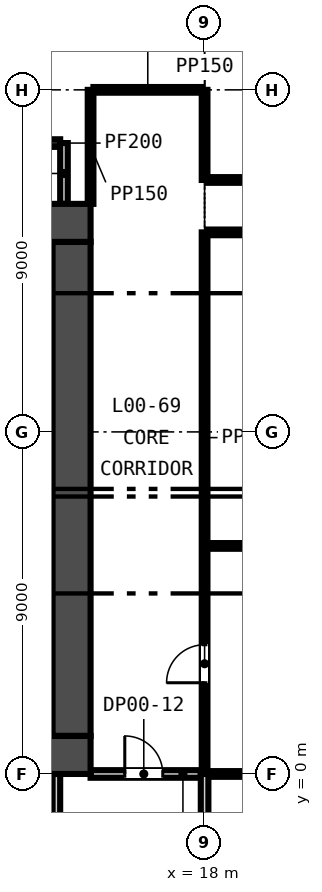
"""IFC4 building model, lengths in metres.
Left out: names, types, materials, properties, quantities, classifications, styles, units other than length and angle.
Written with IfcOpenShell. Run it as: python <this file> out.ifc"""

import sys

from ifc_helpers import new_model, si_unit, direction, frame, frame_2d, origin, place, context, subcontext, project, spatial, rectangle, extrude, element, fill, save


model = new_model("IFC4")
c1 = context("Model", 3, precision=1e-05, world=origin(), true_north=direction((0.0, 1.0)))
c2 = subcontext(c1, "Body", "Model", "MODEL_VIEW")
j1 = project(units=[si_unit("LENGTHUNIT", "METRE"), si_unit("PLANEANGLEUNIT", "RADIAN")], contexts=[c1])
p1 = place(None, origin())
s1 = spatial("IfcSite", under=j1, at=p1, CompositionType="ELEMENT")
p2 = place(p1, origin())
s2 = spatial("IfcBuilding", under=s1, at=p2, CompositionType="ELEMENT")
p3 = place(p2, origin())
s3 = spatial("IfcBuildingStorey", under=s2, at=p3, CompositionType="ELEMENT", Elevation=0.0)
p4 = place(p3, frame((-15.0, 0.5, -2.2), z_axis=(0.0, 0.0, 1.0), x_axis=(1.0, 0.0, 0.0)))
e1 = element("IfcWall", 1, at=p4, inside=s3, PredefinedType="SOLIDWALL", context=c2, shape_type="SweptSolid", body=[
    extrude(rectangle(XDim=30.0, YDim=1.0, at=frame_2d((15.0, 0.0))), origin(), (0.0, 0.0, 1.0), 10.8),
])
p5 = place(p4, frame((5.8, 0.0, 2.2)))
e2 = element("IfcOpeningElement", 2, at=p5, cuts=e1, PredefinedType="OPENING", context=c2, shape_type="SweptSolid", body=[
    extrude(rectangle(XDim=2.4, YDim=2.4, at=frame_2d((1.2, 1.2))), frame((0.0, 0.51, 0.0), z_axis=(0.0, -1.0, 0.0), x_axis=(1.0, 0.0, 0.0)), (0.0, 0.0, 1.0), 1.02),
])
p6 = place(p4, frame((13.8, 0.0, 2.2)))
e3 = element("IfcOpeningElement", 3, at=p6, cuts=e1, PredefinedType="OPENING", context=c2, shape_type="SweptSolid", body=[
    extrude(rectangle(XDim=2.4, YDim=2.4, at=frame_2d((1.2, 1.2))), frame((0.0, 0.51, 0.0), z_axis=(0.0, -1.0, 0.0), x_axis=(1.0, 0.0, 0.0)), (0.0, 0.0, 1.0), 1.02),
])
p7 = place(p4, frame((21.8, 0.0, 2.2)))
e4 = element("IfcOpeningElement", 4, at=p7, cuts=e1, PredefinedType="OPENING", context=c2, shape_type="SweptSolid", body=[
    extrude(rectangle(XDim=2.4, YDim=2.4, at=frame_2d((1.2, 1.2))), frame((0.0, 0.51, 0.0), z_axis=(0.0, -1.0, 0.0), x_axis=(1.0, 0.0, 0.0)), (0.0, 0.0, 1.0), 1.02),
])
p8 = place(p4, frame((1.5, 0.0, 2.2)))
e5 = element("IfcOpeningElement", 5, at=p8, cuts=e1, PredefinedType="OPENING", context=c2, shape_type="SweptSolid", body=[
    extrude(rectangle(XDim=1.2, YDim=2.1, at=frame_2d((0.6, 1.05))), frame((0.0, 0.51, 0.0), z_axis=(0.0, -1.0, 0.0), x_axis=(1.0, 0.0, 0.0)), (0.0, 0.0, 1.0), 1.02),
])
p9 = place(p4, frame((27.3, 0.0, 2.2)))
e6 = element("IfcOpeningElement", 6, at=p9, cuts=e1, PredefinedType="OPENING", context=c2, shape_type="SweptSolid", body=[
    extrude(rectangle(XDim=1.2, YDim=2.1, at=frame_2d((0.6, 1.05))), frame((0.0, 0.51, 0.0), z_axis=(0.0, -1.0, 0.0), x_axis=(1.0, 0.0, 0.0)), (0.0, 0.0, 1.0), 1.02),
])
p10 = place(p3, frame((-15.0, 14.5, -2.2), z_axis=(0.0, 0.0, 1.0), x_axis=(1.0, 0.0, 0.0)))
e7 = element("IfcWall", 7, at=p10, inside=s3, PredefinedType="SOLIDWALL", context=c2, shape_type="SweptSolid", body=[
    extrude(rectangle(XDim=30.0, YDim=1.0, at=frame_2d((15.0, 0.0))), origin(), (0.0, 0.0, 1.0), 10.8),
])
p11 = place(p10, frame((9.25, 0.0, 2.2)))
e8 = element("IfcOpeningElement", 8, at=p11, cuts=e7, PredefinedType="OPENING", context=c2, shape_type="SweptSolid", body=[
    extrude(rectangle(XDim=1.5, YDim=2.1, at=frame_2d((0.75, 1.05))), frame((0.0, 0.51, 0.0), z_axis=(0.0, -1.0, 0.0), x_axis=(1.0, 0.0, 0.0)), (0.0, 0.0, 1.0), 1.02),
])
p12 = place(p10, frame((19.4, 0.0, 2.2)))
e9 = element("IfcOpeningElement", 9, at=p12, cuts=e7, PredefinedType="OPENING", context=c2, shape_type="SweptSolid", body=[
    extrude(rectangle(XDim=1.5, YDim=2.1, at=frame_2d((0.75, 1.05))), frame((0.0, 0.51, 0.0), z_axis=(0.0, -1.0, 0.0), x_axis=(1.0, 0.0, 0.0)), (0.0, 0.0, 1.0), 1.02),
])
p13 = place(p10, frame((1.5, 0.0, 2.2)))
e10 = element("IfcOpeningElement", 10, at=p13, cuts=e7, PredefinedType="OPENING", context=c2, shape_type="SweptSolid", body=[
    extrude(rectangle(XDim=1.2, YDim=2.1, at=frame_2d((0.6, 1.05))), frame((0.0, 0.51, 0.0), z_axis=(0.0, -1.0, 0.0), x_axis=(1.0, 0.0, 0.0)), (0.0, 0.0, 1.0), 1.02),
])
p14 = place(p10, frame((27.3, 0.0, 2.2)))
e11 = element("IfcOpeningElement", 11, at=p14, cuts=e7, PredefinedType="OPENING", context=c2, shape_type="SweptSolid", body=[
    extrude(rectangle(XDim=1.2, YDim=2.1, at=frame_2d((0.6, 1.05))), frame((0.0, 0.51, 0.0), z_axis=(0.0, -1.0, 0.0), x_axis=(1.0, 0.0, 0.0)), (0.0, 0.0, 1.0), 1.02),
])
p15 = place(p3, frame((14.5, 1.0, -2.2), z_axis=(0.0, 0.0, 1.0), x_axis=(0.0, 1.0, 0.0)))
e12 = element("IfcWall", 12, at=p15, inside=s3, PredefinedType="SOLIDWALL", context=c2, shape_type="SweptSolid", body=[
    extrude(rectangle(XDim=13.0, YDim=1.0, at=frame_2d((6.5, 0.0))), origin(), (0.0, 0.0, 1.0), 10.8),
])
p16 = place(p3, frame((11.05, 7.35, 0.0), z_axis=(0.0, 0.0, 1.0), x_axis=(1.0, 0.0, 0.0)))
e13 = element("IfcWall", 13, at=p16, inside=s3, PredefinedType="SOLIDWALL", context=c2, shape_type="SweptSolid", body=[
    extrude(rectangle(XDim=2.95, YDim=0.3, at=frame_2d((1.475, 0.0))), origin(), (0.0, 0.0, 1.0), 8.6),
])
p17 = place(p3, frame((15.0, 0.0, 0.0), z_axis=(0.0, 0.0, 1.0), x_axis=(1.0, 0.0, 0.0)))
e14 = element("IfcWall", 14, at=p17, inside=s3, PredefinedType="PARTITIONING", context=c2, shape_type="SweptSolid", body=[
    extrude(rectangle(XDim=2.9, YDim=0.2, at=frame_2d((1.45, 0.0))), origin(), (0.0, 0.0, 1.0), 8.6),
])
p18 = place(p17, frame((0.9, 0.0, 0.0)))
e15 = element("IfcOpeningElement", 15, at=p18, cuts=e14, PredefinedType="OPENING", context=c2, shape_type="SweptSolid", body=[
    extrude(rectangle(XDim=1.0, YDim=2.1, at=frame_2d((0.5, 1.05))), frame((0.0, 0.11, 0.0), z_axis=(0.0, -1.0, 0.0), x_axis=(1.0, 0.0, 0.0)), (0.0, 0.0, 1.0), 0.22),
])
p19 = place(p3, frame((18.1, 0.0, 0.0), z_axis=(0.0, 0.0, 1.0), x_axis=(1.0, 0.0, 0.0)))
e16 = element("IfcWall", 16, at=p19, inside=s3, PredefinedType="PARTITIONING", context=c2, shape_type="SweptSolid", body=[
    extrude(rectangle(XDim=12.75, YDim=0.15, at=frame_2d((6.375, 0.0))), origin(), (0.0, 0.0, 1.0), 8.6),
])
p20 = place(p19, frame((6.05, 0.0, 0.0)))
e17 = element("IfcOpeningElement", 17, at=p20, cuts=e16, PredefinedType="OPENING", context=c2, shape_type="SweptSolid", body=[
    extrude(rectangle(XDim=1.0, YDim=2.1, at=frame_2d((0.5, 1.05))), frame((0.0, 0.085, 0.0), z_axis=(0.0, -1.0, 0.0), x_axis=(1.0, 0.0, 0.0)), (0.0, 0.0, 1.0), 0.17),
])
p21 = place(p19, frame((9.8, 0.0, 0.0)))
e18 = element("IfcOpeningElement", 18, at=p21, cuts=e16, PredefinedType="OPENING", context=c2, shape_type="SweptSolid", body=[
    extrude(rectangle(XDim=1.0, YDim=2.1, at=frame_2d((0.5, 1.05))), frame((0.0, 0.085, 0.0), z_axis=(0.0, -1.0, 0.0), x_axis=(1.0, 0.0, 0.0)), (0.0, 0.0, 1.0), 0.17),
])
p22 = place(p3, frame((18.075, 6.0, 0.0), z_axis=(0.0, 0.0, 1.0), x_axis=(1.0, 0.0, 0.0)))
e19 = element("IfcWall", 19, at=p22, inside=s3, PredefinedType="PARTITIONING", context=c2, shape_type="SweptSolid", body=[
    extrude(rectangle(XDim=5.863, YDim=0.15, at=frame_2d((2.931, 0.0))), origin(), (0.0, 0.0, 1.0), 8.6),
])
p23 = place(p3, frame((18.075, 14.25, 0.0), z_axis=(0.0, 0.0, 1.0), x_axis=(1.0, 0.0, 0.0)))
e20 = element("IfcWall", 20, at=p23, inside=s3, PredefinedType="PARTITIONING", context=c2, shape_type="SweptSolid", body=[
    extrude(rectangle(XDim=5.175, YDim=0.15, at=frame_2d((2.587, 0.0))), origin(), (0.0, 0.0, 1.0), 8.6),
])
p24 = place(p3, frame((18.075, 15.629, 0.0), z_axis=(0.0, 0.0, 1.0), x_axis=(1.0, 0.0, 0.0)))
e21 = element("IfcWall", 21, at=p24, inside=s3, PredefinedType="PARTITIONING", context=c2, shape_type="SweptSolid", body=[
    extrude(rectangle(XDim=7.482, YDim=0.15, at=frame_2d((3.741, 0.0))), origin(), (0.0, 0.0, 1.0), 8.6),
])
p25 = place(p24, frame((3.15, 0.0, 0.0)))
e22 = element("IfcOpeningElement", 22, at=p25, cuts=e21, PredefinedType="OPENING", context=c2, shape_type="SweptSolid", body=[
    extrude(rectangle(XDim=1.0, YDim=2.1, at=frame_2d((0.5, 1.05))), frame((0.0, 0.085, 0.0), z_axis=(0.0, -1.0, 0.0), x_axis=(1.0, 0.0, 0.0)), (0.0, 0.0, 1.0), 0.17),
])
p26 = place(p3, frame((12.85, 16.6, 0.0), z_axis=(0.0, 0.0, 1.0), x_axis=(1.0, 0.0, 0.0)))
e23 = element("IfcWall", 23, at=p26, inside=s3, PredefinedType="PARTITIONING", context=c2, shape_type="SweptSolid", body=[
    extrude(rectangle(XDim=1.35, YDim=0.2, at=frame_2d((0.675, 0.0))), origin(), (0.0, 0.0, 1.0), 8.6),
])
p27 = place(p3, frame((15.075, 18.0, 0.0), z_axis=(0.0, 0.0, 1.0), x_axis=(1.0, 0.0, 0.0)))
e24 = element("IfcWall", 24, at=p27, inside=s3, PredefinedType="PARTITIONING", context=c2, shape_type="SweptSolid", body=[
    extrude(rectangle(XDim=2.85, YDim=0.15, at=frame_2d((1.425, 0.0))), origin(), (0.0, 0.0, 1.0), 8.6),
])
p28 = place(p3, frame((14.1, -9.4, 0.0), z_axis=(0.0, 0.0, 1.0), x_axis=(0.0, 1.0, 0.0)))
e25 = element("IfcWall", 25, at=p28, inside=s3, PredefinedType="PARTITIONING", context=c2, shape_type="SweptSolid", body=[
    extrude(rectangle(XDim=9.4, YDim=0.2, at=frame_2d((4.7, 0.0))), origin(), (0.0, 0.0, 1.0), 8.6),
])
p29 = place(p3, frame((14.3, 15.0, 0.0), z_axis=(0.0, 0.0, 1.0), x_axis=(0.0, 1.0, 0.0)))
e26 = element("IfcWall", 26, at=p29, inside=s3, PredefinedType="PARTITIONING", context=c2, shape_type="SweptSolid", body=[
    extrude(rectangle(XDim=1.6, YDim=0.2, at=frame_2d((0.8, 0.0))), origin(), (0.0, 0.0, 1.0), 8.6),
])
p30 = place(p3, frame((15.0, 15.0, 0.0), z_axis=(0.0, 0.0, 1.0), x_axis=(0.0, 1.0, 0.0)))
e27 = element("IfcWall", 27, at=p30, inside=s3, PredefinedType="PARTITIONING", context=c2, shape_type="SweptSolid", body=[
    extrude(rectangle(XDim=3.0, YDim=0.15, at=frame_2d((1.5, 0.0))), origin(), (0.0, 0.0, 1.0), 8.6),
])
p31 = place(p3, frame((18.0, -9.4, 0.0), z_axis=(0.0, 0.0, 1.0), x_axis=(0.0, 1.0, 0.0)))
e28 = element("IfcWall", 28, at=p31, inside=s3, PredefinedType="PARTITIONING", context=c2, shape_type="SweptSolid", body=[
    extrude(rectangle(XDim=9.4, YDim=0.2, at=frame_2d((4.7, 0.0))), origin(), (0.0, 0.0, 1.0), 8.6),
])
p32 = place(p3, frame((18.0, 0.0, 0.0), z_axis=(0.0, 0.0, 1.0), x_axis=(0.0, 1.0, 0.0)))
e29 = element("IfcWall", 29, at=p32, inside=s3, PredefinedType="PARTITIONING", context=c2, shape_type="SweptSolid", body=[
    extrude(rectangle(XDim=14.25, YDim=0.15, at=frame_2d((7.125, 0.0))), origin(), (0.0, 0.0, 1.0), 8.6),
])
p33 = place(p32, frame((2.4, 0.0, 0.0)))
e30 = element("IfcOpeningElement", 30, at=p33, cuts=e29, PredefinedType="OPENING", context=c2, shape_type="SweptSolid", body=[
    extrude(rectangle(XDim=1.0, YDim=2.1, at=frame_2d((0.5, 1.05))), frame((0.0, 0.085, 0.0), z_axis=(0.0, -1.0, 0.0), x_axis=(1.0, 0.0, 0.0)), (0.0, 0.0, 1.0), 0.17),
])
p34 = place(p3, frame((18.0, 15.629, 0.0), z_axis=(0.0, 0.0, 1.0), x_axis=(0.0, 1.0, 0.0)))
e31 = element("IfcWall", 31, at=p34, inside=s3, PredefinedType="PARTITIONING", context=c2, shape_type="SweptSolid", body=[
    extrude(rectangle(XDim=2.371, YDim=0.15, at=frame_2d((1.185, 0.0))), origin(), (0.0, 0.0, 1.0), 8.6),
])
p35 = place(p18, origin())
e32 = element("IfcDoor", 32, at=p35, inside=s3, OperationType="SINGLE_SWING_LEFT", PredefinedType="DOOR", context=c2, shape_type="SweptSolid", body=[
    extrude(rectangle(XDim=1.0, YDim=2.1, at=frame_2d((0.5, 1.05))), frame((0.0, 0.025, 0.0), z_axis=(0.0, -1.0, 0.0), x_axis=(1.0, 0.0, 0.0)), (0.0, 0.0, 1.0), 0.05),
])
fill(e15, e32)
p36 = place(p33, origin())
e33 = element("IfcDoor", 33, at=p36, inside=s3, OperationType="SINGLE_SWING_LEFT", PredefinedType="DOOR", context=c2, shape_type="SweptSolid", body=[
    extrude(rectangle(XDim=1.0, YDim=2.1, at=frame_2d((0.5, 1.05))), frame((0.0, 0.025, 0.0), z_axis=(0.0, -1.0, 0.0), x_axis=(1.0, 0.0, 0.0)), (0.0, 0.0, 1.0), 0.05),
])
fill(e30, e33)
save(model, sys.argv[1])
